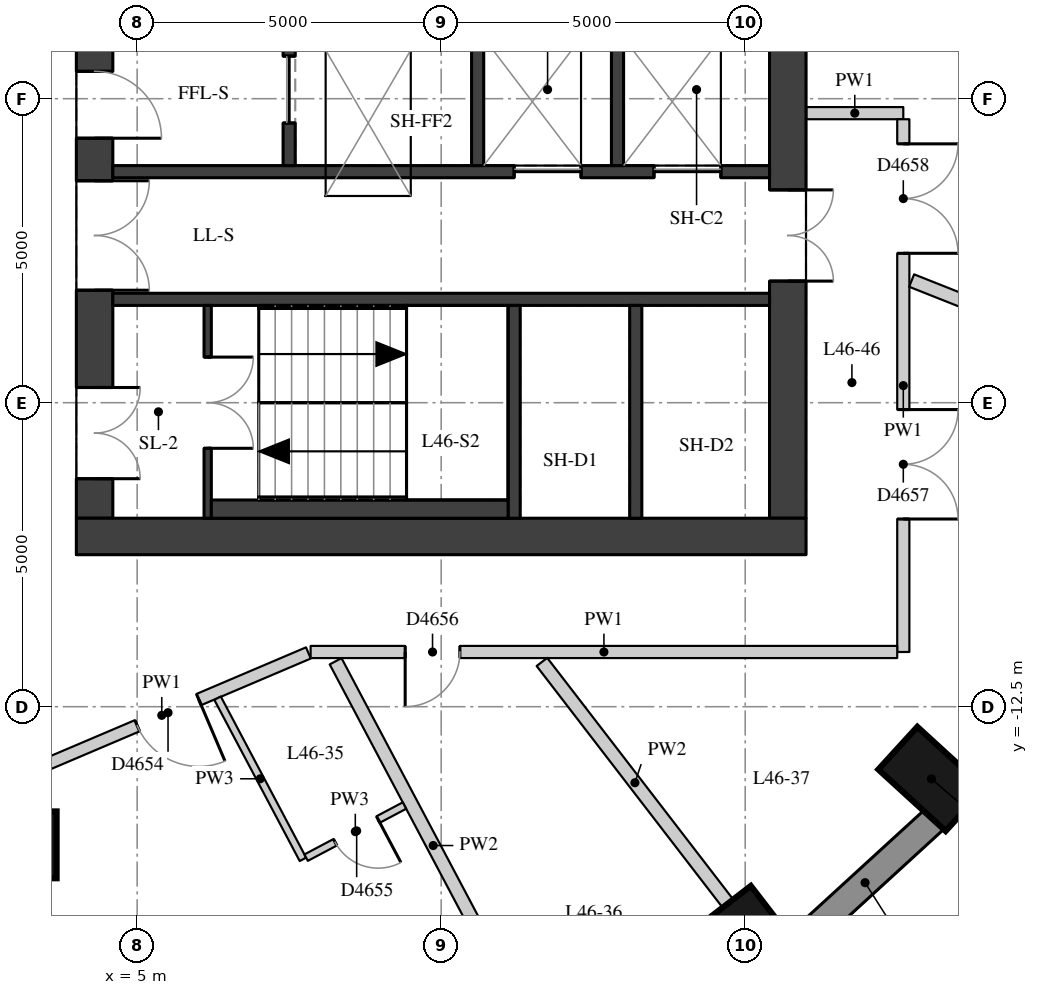
"""IFC4 building model, lengths in metres.
Left out: names, types, materials, properties, quantities, classifications, styles, units other than length and angle.
Written with IfcOpenShell. Run it as: python <this file> out.ifc"""

import sys

from ifc_helpers import new_model, si_unit, direction, frame, frame_2d, origin, origin_2d, place, context, subcontext, project, spatial, rectangle, extrude, element, fill, save


model = new_model("IFC4")
c1 = context("Model", 3, precision=1e-05, world=origin(), true_north=direction((0.0, 1.0)))
c2 = subcontext(c1, "Body", "Model", "MODEL_VIEW")
j1 = project(units=[si_unit("LENGTHUNIT", "METRE"), si_unit("PLANEANGLEUNIT", "RADIAN")], contexts=[c1])
p1 = place(None, origin())
s1 = spatial("IfcSite", under=j1, at=p1, CompositionType="ELEMENT")
p2 = place(p1, origin())
s2 = spatial("IfcBuilding", under=s1, at=p2, CompositionType="ELEMENT")
p3 = place(p2, frame((0.0, 0.0, 164.9)))
s3 = spatial("IfcBuildingStorey", under=s2, at=p3, CompositionType="ELEMENT", Elevation=164.9)
for number, where, z_axis, x_axis in (
    (1, (15.173, -16.332, 0.0), (0.0, 0.0, 1.0), (0.61, -0.792, 0.0)),
    (2, (18.064, -13.688, 0.0), (0.0, 0.0, 1.0), (0.738, -0.675, 0.0)),
):
    element("IfcColumn", number, at=place(p3, frame(where, z_axis=z_axis, x_axis=x_axis)), inside=s3, PredefinedType="COLUMN", context=c2, shape_type="SweptSolid", body=[
        extrude(rectangle(XDim=1.5, YDim=0.95, at=origin_2d()), origin(), (0.0, 0.0, 1.0), 3.3),
    ])
p4 = place(p3, frame((3.126, -14.772, 0.0), z_axis=(0.0, 0.0, 1.0), x_axis=(1.0, 0.0, 0.0)))
e3 = element("IfcColumn", 3, at=p4, inside=s3, PredefinedType="COLUMN", context=c2, shape_type="SweptSolid", body=[
    extrude(rectangle(XDim=1.1, YDim=1.1, at=origin_2d()), origin(), (0.0, 0.0, 1.0), 3.3),
])
p5 = place(p3, frame((15.83, -16.439, 0.0), z_axis=(0.0, 0.0, 1.0), x_axis=(0.737808755941, 0.675009807082, 0.0)))
e4 = element("IfcWall", 4, at=p5, inside=s3, PredefinedType="SOLIDWALL", context=c2, shape_type="SweptSolid", body=[
    extrude(rectangle(XDim=3.094, YDim=0.45, at=frame_2d((1.547, 0.0))), origin(), (0.0, 0.0, 1.0), 3.02),
])
p6 = place(p3, frame((4.3, -9.4, 0.0), z_axis=(0.0, 0.0, 1.0), x_axis=(0.0, 1.0, 0.0)))
e5 = element("IfcWall", 5, at=p6, inside=s3, PredefinedType="SHEAR", context=c2, shape_type="SweptSolid", body=[
    extrude(rectangle(XDim=18.8, YDim=0.6, at=frame_2d((9.4, 0.0))), origin(), (0.0, 0.0, 1.0), 3.02),
])
p7 = place(p6, frame((0.65, 0.0, 0.0)))
e6 = element("IfcOpeningElement", 6, at=p7, cuts=e5, PredefinedType="OPENING", context=c2, shape_type="SweptSolid", body=[
    extrude(rectangle(XDim=1.5, YDim=2.1, at=frame_2d((0.75, 1.05))), frame((0.0, 0.31, 0.0), z_axis=(0.0, -1.0, 0.0), x_axis=(1.0, 0.0, 0.0)), (0.0, 0.0, 1.0), 0.62),
])
p8 = place(p6, frame((3.75, 0.0, 0.0)))
e7 = element("IfcOpeningElement", 7, at=p8, cuts=e5, PredefinedType="OPENING", context=c2, shape_type="SweptSolid", body=[
    extrude(rectangle(XDim=1.8, YDim=2.1, at=frame_2d((0.9, 1.05))), frame((0.0, 0.31, 0.0), z_axis=(0.0, -1.0, 0.0), x_axis=(1.0, 0.0, 0.0)), (0.0, 0.0, 1.0), 0.62),
])
p9 = place(p6, frame((6.25, 0.0, 0.0)))
e8 = element("IfcOpeningElement", 8, at=p9, cuts=e5, PredefinedType="OPENING", context=c2, shape_type="SweptSolid", body=[
    extrude(rectangle(XDim=1.1, YDim=2.1, at=frame_2d((0.55, 1.05))), frame((0.0, 0.31, 0.0), z_axis=(0.0, -1.0, 0.0), x_axis=(1.0, 0.0, 0.0)), (0.0, 0.0, 1.0), 0.62),
])
p10 = place(p6, frame((8.9, 0.0, 0.0)))
e9 = element("IfcOpeningElement", 9, at=p10, cuts=e5, PredefinedType="OPENING", context=c2, shape_type="SweptSolid", body=[
    extrude(rectangle(XDim=1.0, YDim=2.1, at=frame_2d((0.5, 1.05))), frame((0.0, 0.31, 0.0), z_axis=(0.0, -1.0, 0.0), x_axis=(1.0, 0.0, 0.0)), (0.0, 0.0, 1.0), 0.62),
])
p11 = place(p6, frame((11.45, 0.0, 0.0)))
e10 = element("IfcOpeningElement", 10, at=p11, cuts=e5, PredefinedType="OPENING", context=c2, shape_type="SweptSolid", body=[
    extrude(rectangle(XDim=1.1, YDim=2.1, at=frame_2d((0.55, 1.05))), frame((0.0, 0.31, 0.0), z_axis=(0.0, -1.0, 0.0), x_axis=(1.0, 0.0, 0.0)), (0.0, 0.0, 1.0), 0.62),
])
p12 = place(p6, frame((13.25, 0.0, 0.0)))
e11 = element("IfcOpeningElement", 11, at=p12, cuts=e5, PredefinedType="OPENING", context=c2, shape_type="SweptSolid", body=[
    extrude(rectangle(XDim=1.8, YDim=2.1, at=frame_2d((0.9, 1.05))), frame((0.0, 0.31, 0.0), z_axis=(0.0, -1.0, 0.0), x_axis=(1.0, 0.0, 0.0)), (0.0, 0.0, 1.0), 0.62),
])
p13 = place(p6, frame((16.65, 0.0, 0.0)))
e12 = element("IfcOpeningElement", 12, at=p13, cuts=e5, PredefinedType="OPENING", context=c2, shape_type="SweptSolid", body=[
    extrude(rectangle(XDim=1.5, YDim=2.1, at=frame_2d((0.75, 1.05))), frame((0.0, 0.31, 0.0), z_axis=(0.0, -1.0, 0.0), x_axis=(1.0, 0.0, 0.0)), (0.0, 0.0, 1.0), 0.62),
])
p14 = place(p3, frame((15.7, -9.4, 0.0), z_axis=(0.0, 0.0, 1.0), x_axis=(0.0, 1.0, 0.0)))
e13 = element("IfcWall", 13, at=p14, inside=s3, PredefinedType="SHEAR", context=c2, shape_type="SweptSolid", body=[
    extrude(rectangle(XDim=18.8, YDim=0.6, at=frame_2d((9.4, 0.0))), origin(), (0.0, 0.0, 1.0), 3.02),
])
p15 = place(p14, frame((13.4, 0.0, 0.0)))
e14 = element("IfcOpeningElement", 14, at=p15, cuts=e13, PredefinedType="OPENING", context=c2, shape_type="SweptSolid", body=[
    extrude(rectangle(XDim=1.5, YDim=2.1, at=frame_2d((0.75, 1.05))), frame((0.0, 0.31, 0.0), z_axis=(0.0, -1.0, 0.0), x_axis=(1.0, 0.0, 0.0)), (0.0, 0.0, 1.0), 0.62),
])
p16 = place(p14, frame((3.9, 0.0, 0.0)))
e15 = element("IfcOpeningElement", 15, at=p16, cuts=e13, PredefinedType="OPENING", context=c2, shape_type="SweptSolid", body=[
    extrude(rectangle(XDim=1.5, YDim=2.1, at=frame_2d((0.75, 1.05))), frame((0.0, 0.31, 0.0), z_axis=(0.0, -1.0, 0.0), x_axis=(1.0, 0.0, 0.0)), (0.0, 0.0, 1.0), 0.62),
])
p17 = place(p3, frame((4.0, -9.7, 0.0), z_axis=(0.0, 0.0, 1.0), x_axis=(1.0, 0.0, 0.0)))
e16 = element("IfcWall", 16, at=p17, inside=s3, PredefinedType="SHEAR", context=c2, shape_type="SweptSolid", body=[
    extrude(rectangle(XDim=12.0, YDim=0.6, at=frame_2d((6.0, 0.0))), origin(), (0.0, 0.0, 1.0), 3.02),
])
p18 = place(p3, frame((4.6, -3.7, 0.0), z_axis=(0.0, 0.0, 1.0), x_axis=(1.0, 0.0, 0.0)))
e17 = element("IfcWall", 17, at=p18, inside=s3, PredefinedType="SHEAR", context=c2, shape_type="SweptSolid", body=[
    extrude(rectangle(XDim=10.8, YDim=0.2, at=frame_2d((5.4, 0.0))), origin(), (0.0, 0.0, 1.0), 3.02),
])
p19 = place(p18, frame((6.6, 0.0, 0.0)))
e18 = element("IfcOpeningElement", 18, at=p19, cuts=e17, PredefinedType="OPENING", context=c2, shape_type="SweptSolid", body=[
    extrude(rectangle(XDim=1.1, YDim=2.1, at=frame_2d((0.55, 1.05))), frame((0.0, 0.11, 0.0), z_axis=(0.0, -1.0, 0.0), x_axis=(1.0, 0.0, 0.0)), (0.0, 0.0, 1.0), 0.22),
])
p20 = place(p18, frame((8.9, 0.0, 0.0)))
e19 = element("IfcOpeningElement", 19, at=p20, cuts=e17, PredefinedType="OPENING", context=c2, shape_type="SweptSolid", body=[
    extrude(rectangle(XDim=1.1, YDim=2.1, at=frame_2d((0.55, 1.05))), frame((0.0, 0.11, 0.0), z_axis=(0.0, -1.0, 0.0), x_axis=(1.0, 0.0, 0.0)), (0.0, 0.0, 1.0), 0.22),
])
p21 = place(p3, frame((4.6, -5.8, 0.0), z_axis=(0.0, 0.0, 1.0), x_axis=(1.0, 0.0, 0.0)))
e20 = element("IfcWall", 20, at=p21, inside=s3, PredefinedType="SHEAR", context=c2, shape_type="SweptSolid", body=[
    extrude(rectangle(XDim=10.8, YDim=0.2, at=frame_2d((5.4, 0.0))), origin(), (0.0, 0.0, 1.0), 3.02),
])
for number, where, z_axis, x_axis in (
    (21, (11.2, -9.4, 0.0), (0.0, 0.0, 1.0), (0.0, 1.0, 0.0)),
    (22, (13.2, -9.4, 0.0), (0.0, 0.0, 1.0), (0.0, 1.0, 0.0)),
):
    element("IfcWall", number, at=place(p3, frame(where, z_axis=z_axis, x_axis=x_axis)), inside=s3, PredefinedType="SHEAR", context=c2, shape_type="SweptSolid", body=[
        extrude(rectangle(XDim=3.5, YDim=0.2, at=frame_2d((1.75, 0.0))), origin(), (0.0, 0.0, 1.0), 3.02),
    ])
p22 = place(p3, frame((7.5, -3.6, 0.0), z_axis=(0.0, 0.0, 1.0), x_axis=(0.0, 1.0, 0.0)))
e23 = element("IfcWall", 23, at=p22, inside=s3, PredefinedType="SHEAR", context=c2, shape_type="SweptSolid", body=[
    extrude(rectangle(XDim=2.5, YDim=0.2, at=frame_2d((1.25, 0.0))), origin(), (0.0, 0.0, 1.0), 3.02),
])
p23 = place(p22, frame((0.7, 0.0, 0.0)))
e24 = element("IfcOpeningElement", 24, at=p23, cuts=e23, PredefinedType="OPENING", context=c2, shape_type="SweptSolid", body=[
    extrude(rectangle(XDim=1.1, YDim=2.1, at=frame_2d((0.55, 1.05))), frame((0.0, 0.11, 0.0), z_axis=(0.0, -1.0, 0.0), x_axis=(1.0, 0.0, 0.0)), (0.0, 0.0, 1.0), 0.22),
])
for number, where, z_axis, x_axis in (
    (25, (10.6, -3.6, 0.0), (0.0, 0.0, 1.0), (0.0, 1.0, 0.0)),
    (26, (12.9, -3.6, 0.0), (0.0, 0.0, 1.0), (0.0, 1.0, 0.0)),
):
    element("IfcWall", number, at=place(p3, frame(where, z_axis=z_axis, x_axis=x_axis)), inside=s3, PredefinedType="SHEAR", context=c2, shape_type="SweptSolid", body=[
        extrude(rectangle(XDim=2.5, YDim=0.2, at=frame_2d((1.25, 0.0))), origin(), (0.0, 0.0, 1.0), 3.02),
    ])
p24 = place(p3, frame((6.16, -9.4, 0.0), z_axis=(0.0, 0.0, 1.0), x_axis=(0.0, 1.0, 0.0)))
e27 = element("IfcWall", 27, at=p24, inside=s3, PredefinedType="SHEAR", context=c2, shape_type="SweptSolid", body=[
    extrude(rectangle(XDim=3.5, YDim=0.12, at=frame_2d((1.75, 0.0))), origin(), (0.0, 0.0, 1.0), 3.02),
])
p25 = place(p24, frame((1.15, 0.0, 0.0)))
e28 = element("IfcOpeningElement", 28, at=p25, cuts=e27, PredefinedType="OPENING", context=c2, shape_type="SweptSolid", body=[
    extrude(rectangle(XDim=1.5, YDim=2.1, at=frame_2d((0.75, 1.05))), frame((0.0, 0.07, 0.0), z_axis=(0.0, -1.0, 0.0), x_axis=(1.0, 0.0, 0.0)), (0.0, 0.0, 1.0), 0.14),
])
p26 = place(p3, frame((6.22, -9.25, 0.0), z_axis=(0.0, 0.0, 1.0), x_axis=(1.0, 0.0, 0.0)))
e29 = element("IfcWall", 29, at=p26, inside=s3, PredefinedType="PARTITIONING", context=c2, shape_type="SweptSolid", body=[
    extrude(rectangle(XDim=4.88, YDim=0.3, at=frame_2d((2.44, 0.0))), origin(), (0.0, 0.0, 1.0), 3.02),
])
p27 = place(p3, frame((16.004, -2.738, 0.0), z_axis=(0.0, 0.0, 1.0), x_axis=(1.0, 0.0, 0.0)))
e30 = element("IfcWall", 30, at=p27, inside=s3, PredefinedType="PARTITIONING", context=c2, shape_type="SweptSolid", body=[
    extrude(rectangle(XDim=1.596, YDim=0.2, at=frame_2d((0.798, 0.0))), origin(), (0.0, 0.0, 1.0), 3.02),
])
p28 = place(p3, frame((17.6, -2.838, 0.0), z_axis=(0.0, 0.0, 1.0), x_axis=(0.0, -1.0, 0.0)))
e31 = element("IfcWall", 31, at=p28, inside=s3, PredefinedType="PARTITIONING", context=c2, shape_type="SweptSolid", body=[
    extrude(rectangle(XDim=8.762, YDim=0.2, at=frame_2d((4.381, 0.0))), origin(), (0.0, 0.0, 1.0), 3.02),
])
p29 = place(p28, frame((4.775, 0.0, 0.0)))
e32 = element("IfcOpeningElement", 32, at=p29, cuts=e31, PredefinedType="OPENING", context=c2, shape_type="SweptSolid", body=[
    extrude(rectangle(XDim=1.8, YDim=2.1, at=frame_2d((0.9, 1.05))), frame((0.0, 0.11, 0.0), z_axis=(0.0, -1.0, 0.0), x_axis=(1.0, 0.0, 0.0)), (0.0, 0.0, 1.0), 0.22),
])
p30 = place(p28, frame((0.405, 0.0, 0.0)))
e33 = element("IfcOpeningElement", 33, at=p30, cuts=e31, PredefinedType="OPENING", context=c2, shape_type="SweptSolid", body=[
    extrude(rectangle(XDim=1.8, YDim=2.1, at=frame_2d((0.9, 1.05))), frame((0.0, 0.11, 0.0), z_axis=(0.0, -1.0, 0.0), x_axis=(1.0, 0.0, 0.0)), (0.0, 0.0, 1.0), 0.22),
])
p31 = place(p3, frame((17.5, -11.6, 0.0), z_axis=(0.0, 0.0, 1.0), x_axis=(-1.0, 0.0, 0.0)))
e34 = element("IfcWall", 34, at=p31, inside=s3, PredefinedType="PARTITIONING", context=c2, shape_type="SweptSolid", body=[
    extrude(rectangle(XDim=9.647, YDim=0.2, at=frame_2d((4.823, 0.0))), origin(), (0.0, 0.0, 1.0), 3.02),
])
p32 = place(p31, frame((7.192, 0.0, 0.0)))
e35 = element("IfcOpeningElement", 35, at=p32, cuts=e34, PredefinedType="OPENING", context=c2, shape_type="SweptSolid", body=[
    extrude(rectangle(XDim=0.9, YDim=2.1, at=frame_2d((0.45, 1.05))), frame((0.0, 0.11, 0.0), z_axis=(0.0, -1.0, 0.0), x_axis=(1.0, 0.0, 0.0)), (0.0, 0.0, 1.0), 0.22),
])
p33 = place(p3, frame((7.816, -11.616, 0.0), z_axis=(0.0, 0.0, 1.0), x_axis=(-0.92017534212, -0.391506500271, 0.0)))
e36 = element("IfcWall", 36, at=p33, inside=s3, PredefinedType="PARTITIONING", context=c2, shape_type="SweptSolid", body=[
    extrude(rectangle(XDim=5.242, YDim=0.2, at=frame_2d((2.621, 0.0))), origin(), (0.0, 0.0, 1.0), 3.02),
])
p34 = place(p33, frame((1.959, 0.0, 0.0)))
e37 = element("IfcOpeningElement", 37, at=p34, cuts=e36, PredefinedType="OPENING", context=c2, shape_type="SweptSolid", body=[
    extrude(rectangle(XDim=1.1, YDim=2.1, at=frame_2d((0.55, 1.05))), frame((0.0, 0.11, 0.0), z_axis=(0.0, -1.0, 0.0), x_axis=(1.0, 0.0, 0.0)), (0.0, 0.0, 1.0), 0.22),
])
p35 = place(p3, frame((4.052, -20.284, 0.0), z_axis=(0.0, 0.0, 1.0), x_axis=(-0.159678232595, 0.987169115215, 0.0)))
e38 = element("IfcWall", 38, at=p35, inside=s3, PredefinedType="PARTITIONING", context=c2, shape_type="SweptSolid", body=[
    extrude(rectangle(XDim=6.594, YDim=0.22, at=frame_2d((3.297, 0.0))), origin(), (0.0, 0.0, 1.0), 2.57),
])
p36 = place(p3, frame((11.474, -17.813, 0.0), z_axis=(0.0, 0.0, 1.0), x_axis=(-0.468051273849, 0.88370130986, 0.0)))
e39 = element("IfcWall", 39, at=p36, inside=s3, PredefinedType="PARTITIONING", context=c2, shape_type="SweptSolid", body=[
    extrude(rectangle(XDim=6.858, YDim=0.22, at=frame_2d((3.429, 0.0))), origin(), (0.0, 0.0, 1.0), 3.02),
])
p37 = place(p3, frame((14.716, -15.737, 0.0), z_axis=(0.0, 0.0, 1.0), x_axis=(-0.609986007715, 0.792412184657, 0.0)))
e40 = element("IfcWall", 40, at=p37, inside=s3, PredefinedType="PARTITIONING", context=c2, shape_type="SweptSolid", body=[
    extrude(rectangle(XDim=5.015, YDim=0.22, at=frame_2d((2.507, 0.0))), origin(), (0.0, 0.0, 1.0), 3.02),
])
p38 = place(p3, frame((21.439, -6.96, 0.0), z_axis=(0.0, 0.0, 1.0), x_axis=(-0.929517399972, 0.368778257426, 0.0)))
e41 = element("IfcWall", 41, at=p38, inside=s3, PredefinedType="PARTITIONING", context=c2, shape_type="SweptSolid", body=[
    extrude(rectangle(XDim=3.982, YDim=0.22, at=frame_2d((1.991, 0.0))), origin(), (0.0, 0.0, 1.0), 3.02),
])
p39 = place(p3, frame((6.323, -12.36, 0.0), z_axis=(0.0, 0.0, 1.0), x_axis=(0.468059755139, -0.883696817703, 0.0)))
e42 = element("IfcWall", 42, at=p39, inside=s3, PredefinedType="PARTITIONING", context=c2, shape_type="SweptSolid", body=[
    extrude(rectangle(XDim=2.999, YDim=0.12, at=frame_2d((1.5, 0.0))), origin(), (0.0, 0.0, 1.0), 3.02),
])
p40 = place(p3, frame((7.779, -14.983, 0.0), z_axis=(0.0, 0.0, 1.0), x_axis=(0.883697051485, 0.46805931376, 0.0)))
e43 = element("IfcWall", 43, at=p40, inside=s3, PredefinedType="PARTITIONING", context=c2, shape_type="SweptSolid", body=[
    extrude(rectangle(XDim=1.83, YDim=0.12, at=frame_2d((0.915, 0.0))), origin(), (0.0, 0.0, 1.0), 3.02),
])
p41 = place(p40, frame((0.54, 0.0, 0.0)))
e44 = element("IfcOpeningElement", 44, at=p41, cuts=e43, PredefinedType="OPENING", context=c2, shape_type="SweptSolid", body=[
    extrude(rectangle(XDim=0.8, YDim=2.1, at=frame_2d((0.4, 1.05))), frame((0.0, 0.07, 0.0), z_axis=(0.0, -1.0, 0.0), x_axis=(1.0, 0.0, 0.0)), (0.0, 0.0, 1.0), 0.14),
])
p42 = place(p7, origin())
e45 = element("IfcDoor", 45, at=p42, inside=s3, OperationType="DOUBLE_DOOR_SINGLE_SWING", PredefinedType="DOOR", context=c2, shape_type="SweptSolid", body=[
    extrude(rectangle(XDim=1.5, YDim=2.1, at=frame_2d((0.75, 1.05))), frame((0.0, 0.025, 0.0), z_axis=(0.0, -1.0, 0.0), x_axis=(1.0, 0.0, 0.0)), (0.0, 0.0, 1.0), 0.05),
])
fill(e6, e45)
p43 = place(p8, origin())
e46 = element("IfcDoor", 46, at=p43, inside=s3, OperationType="DOUBLE_DOOR_SINGLE_SWING", PredefinedType="DOOR", context=c2, shape_type="SweptSolid", body=[
    extrude(rectangle(XDim=1.8, YDim=2.1, at=frame_2d((0.9, 1.05))), frame((0.0, 0.025, 0.0), z_axis=(0.0, -1.0, 0.0), x_axis=(1.0, 0.0, 0.0)), (0.0, 0.0, 1.0), 0.05),
])
fill(e7, e46)
p44 = place(p9, origin())
e47 = element("IfcDoor", 47, at=p44, inside=s3, OperationType="SINGLE_SWING_RIGHT", PredefinedType="DOOR", context=c2, shape_type="SweptSolid", body=[
    extrude(rectangle(XDim=1.1, YDim=2.1, at=frame_2d((0.55, 1.05))), frame((0.0, 0.025, 0.0), z_axis=(0.0, -1.0, 0.0), x_axis=(1.0, 0.0, 0.0)), (0.0, 0.0, 1.0), 0.05),
])
fill(e8, e47)
p45 = place(p16, origin())
e48 = element("IfcDoor", 48, at=p45, inside=s3, OperationType="DOUBLE_DOOR_SINGLE_SWING", PredefinedType="DOOR", context=c2, shape_type="SweptSolid", body=[
    extrude(rectangle(XDim=1.5, YDim=2.1, at=frame_2d((0.75, 1.05))), frame((0.0, 0.025, 0.0), z_axis=(0.0, -1.0, 0.0), x_axis=(1.0, 0.0, 0.0)), (0.0, 0.0, 1.0), 0.05),
])
fill(e15, e48)
p46 = place(p25, origin())
e49 = element("IfcDoor", 49, at=p46, inside=s3, OperationType="DOUBLE_DOOR_SINGLE_SWING", PredefinedType="DOOR", context=c2, shape_type="SweptSolid", body=[
    extrude(rectangle(XDim=1.5, YDim=2.1, at=frame_2d((0.75, 1.05))), frame((0.0, 0.025, 0.0), z_axis=(0.0, -1.0, 0.0), x_axis=(1.0, 0.0, 0.0)), (0.0, 0.0, 1.0), 0.05),
])
fill(e28, e49)
p47 = place(p19, origin())
e50 = element("IfcDoor", 50, at=p47, inside=s3, OperationType="DOUBLE_DOOR_SLIDING", PredefinedType="DOOR", context=c2, shape_type="SweptSolid", body=[
    extrude(rectangle(XDim=1.1, YDim=2.1, at=frame_2d((0.55, 1.05))), frame((0.0, 0.025, 0.0), z_axis=(0.0, -1.0, 0.0), x_axis=(1.0, 0.0, 0.0)), (0.0, 0.0, 1.0), 0.05),
])
fill(e18, e50)
p48 = place(p20, origin())
e51 = element("IfcDoor", 51, at=p48, inside=s3, OperationType="DOUBLE_DOOR_SLIDING", PredefinedType="DOOR", context=c2, shape_type="SweptSolid", body=[
    extrude(rectangle(XDim=1.1, YDim=2.1, at=frame_2d((0.55, 1.05))), frame((0.0, 0.025, 0.0), z_axis=(0.0, -1.0, 0.0), x_axis=(1.0, 0.0, 0.0)), (0.0, 0.0, 1.0), 0.05),
])
fill(e19, e51)
p49 = place(p23, origin())
e52 = element("IfcDoor", 52, at=p49, inside=s3, OperationType="DOUBLE_DOOR_SLIDING", PredefinedType="DOOR", context=c2, shape_type="SweptSolid", body=[
    extrude(rectangle(XDim=1.1, YDim=2.1, at=frame_2d((0.55, 1.05))), frame((0.0, 0.025, 0.0), z_axis=(0.0, -1.0, 0.0), x_axis=(1.0, 0.0, 0.0)), (0.0, 0.0, 1.0), 0.05),
])
fill(e24, e52)
p50 = place(p34, origin())
e53 = element("IfcDoor", 53, at=p50, inside=s3, OperationType="SINGLE_SWING_LEFT", PredefinedType="DOOR", context=c2, shape_type="SweptSolid", body=[
    extrude(rectangle(XDim=1.1, YDim=2.1, at=frame_2d((0.55, 1.05))), frame((0.0, 0.025, 0.0), z_axis=(0.0, -1.0, 0.0), x_axis=(1.0, 0.0, 0.0)), (0.0, 0.0, 1.0), 0.05),
])
fill(e37, e53)
p51 = place(p41, origin())
e54 = element("IfcDoor", 54, at=p51, inside=s3, OperationType="SINGLE_SWING_LEFT", PredefinedType="DOOR", context=c2, shape_type="SweptSolid", body=[
    extrude(rectangle(XDim=0.8, YDim=2.1, at=frame_2d((0.4, 1.05))), frame((0.0, 0.025, 0.0), z_axis=(0.0, -1.0, 0.0), x_axis=(1.0, 0.0, 0.0)), (0.0, 0.0, 1.0), 0.05),
])
fill(e44, e54)
p52 = place(p32, origin())
e55 = element("IfcDoor", 55, at=p52, inside=s3, OperationType="SINGLE_SWING_RIGHT", PredefinedType="DOOR", context=c2, shape_type="SweptSolid", body=[
    extrude(rectangle(XDim=0.9, YDim=2.1, at=frame_2d((0.45, 1.05))), frame((0.0, 0.025, 0.0), z_axis=(0.0, -1.0, 0.0), x_axis=(1.0, 0.0, 0.0)), (0.0, 0.0, 1.0), 0.05),
])
fill(e35, e55)
p53 = place(p29, origin())
e56 = element("IfcDoor", 56, at=p53, inside=s3, OperationType="DOUBLE_DOOR_SINGLE_SWING", PredefinedType="DOOR", context=c2, shape_type="SweptSolid", body=[
    extrude(rectangle(XDim=1.8, YDim=2.1, at=frame_2d((0.9, 1.05))), frame((0.0, 0.025, 0.0), z_axis=(0.0, -1.0, 0.0), x_axis=(1.0, 0.0, 0.0)), (0.0, 0.0, 1.0), 0.05),
])
fill(e32, e56)
p54 = place(p30, origin())
e57 = element("IfcDoor", 57, at=p54, inside=s3, OperationType="DOUBLE_DOOR_SINGLE_SWING", PredefinedType="DOOR", context=c2, shape_type="SweptSolid", body=[
    extrude(rectangle(XDim=1.8, YDim=2.1, at=frame_2d((0.9, 1.05))), frame((0.0, 0.025, 0.0), z_axis=(0.0, -1.0, 0.0), x_axis=(1.0, 0.0, 0.0)), (0.0, 0.0, 1.0), 0.05),
])
fill(e33, e57)
save(model, sys.argv[1])
